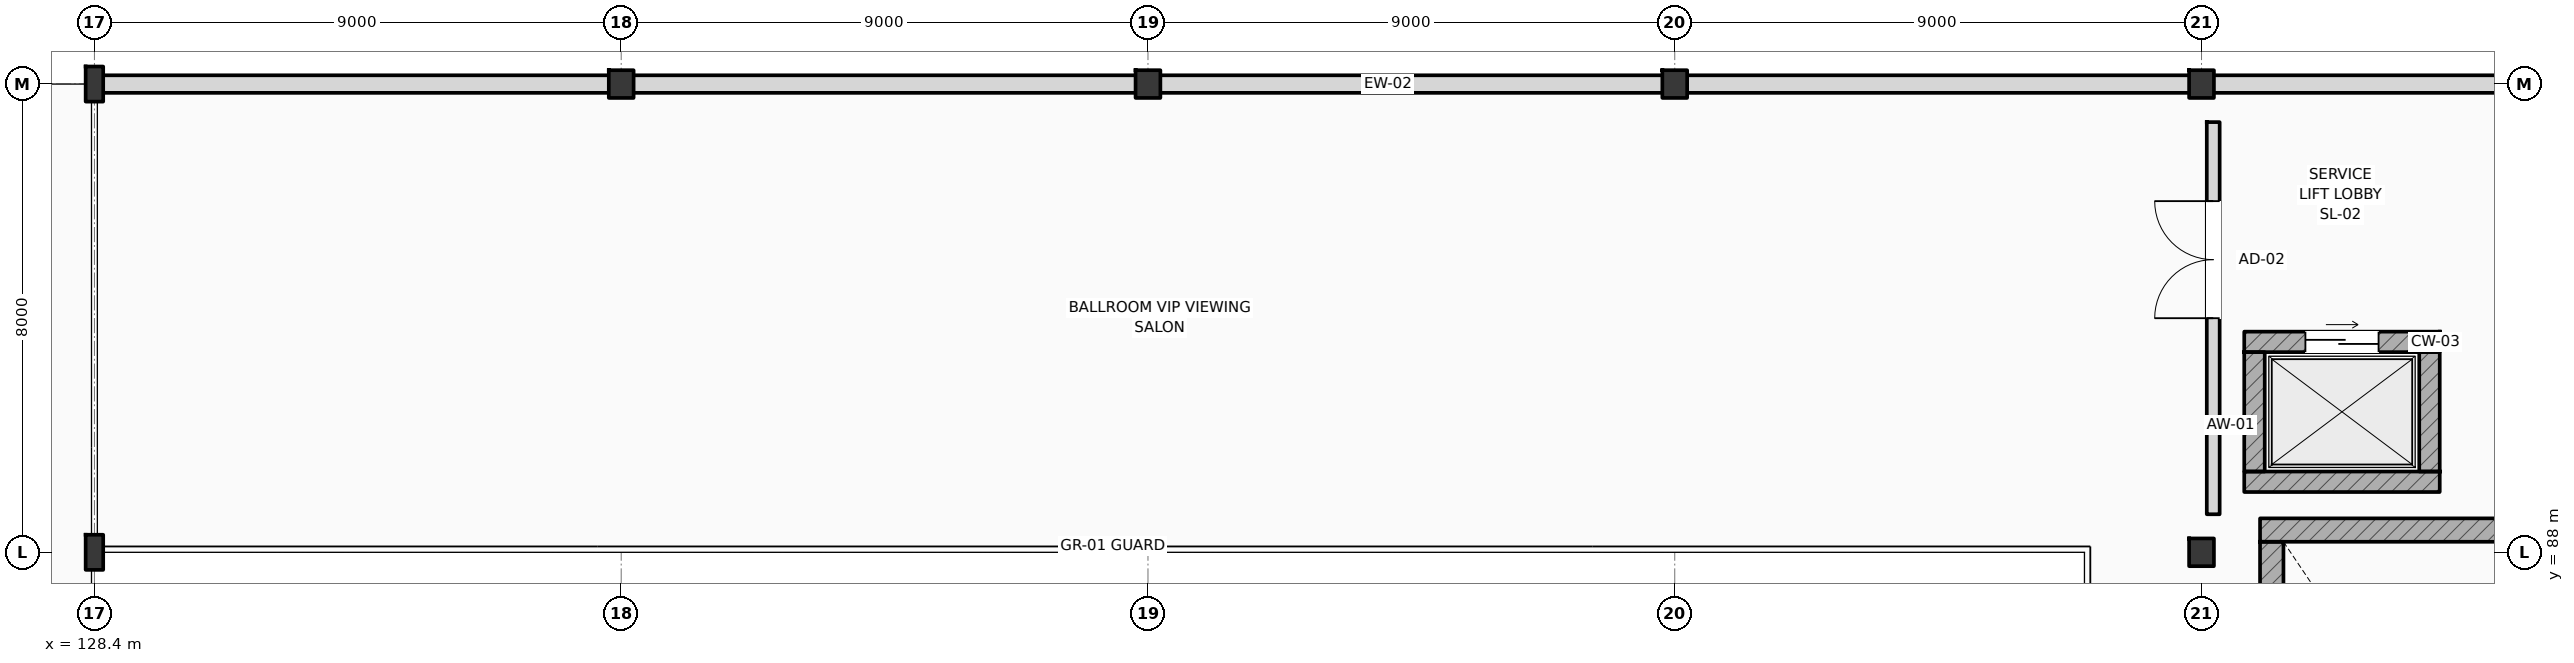
"""IFC4 building model, lengths in metres.
Left out: names, types, materials, properties, quantities, classifications, styles, units other than length and angle.
Written with IfcOpenShell. Run it as: python <this file> out.ifc"""

import sys

from ifc_helpers import new_model, si_unit, direction, frame, frame_2d, origin, origin_2d, place, context, subcontext, project, spatial, rectangle, i_section, extrude, element, fill, save


model = new_model("IFC4")
c1 = context("Model", 3, precision=1e-05, world=origin(), true_north=direction((0.0, 1.0)))
c2 = subcontext(c1, "Body", "Model", "MODEL_VIEW")
j1 = project(units=[si_unit("LENGTHUNIT", "METRE"), si_unit("PLANEANGLEUNIT", "RADIAN")], contexts=[c1])
p1 = place(None, origin())
s1 = spatial("IfcSite", under=j1, at=p1, CompositionType="ELEMENT")
p2 = place(p1, origin())
s2 = spatial("IfcBuilding", under=s1, at=p2, CompositionType="ELEMENT")
p3 = place(p2, frame((0.0, 0.0, 6.0)))
s3 = spatial("IfcBuildingStorey", under=s2, at=p3, CompositionType="ELEMENT", Elevation=6.0)
for number, where, z_axis, x_axis in (
    (1, (128.4, 88.0, 0.0), (0.0, 0.0, 1.0), (1.0, 0.0, 0.0)),
    (2, (128.4, 96.0, 0.0), (0.0, 0.0, 1.0), (1.0, 0.0, 0.0)),
):
    element("IfcColumn", number, at=place(p3, frame(where, z_axis=z_axis, x_axis=x_axis)), inside=s3, PredefinedType="COLUMN", context=c2, shape_type="SweptSolid", body=[
        extrude(i_section(OverallWidth=0.3, OverallDepth=0.6, WebThickness=0.015, FlangeThickness=0.03, FilletRadius=0.027, at=origin_2d()), origin(), (0.0, 0.0, 1.0), 5.4),
    ])
for number, where, z_axis, x_axis in (
    (3, (164.4, 88.0, 0.0), (0.0, 0.0, 1.0), (1.0, 0.0, 0.0)),
    (4, (164.4, 96.0, 0.0), (0.0, 0.0, 1.0), (1.0, 0.0, 0.0)),
    (5, (137.4, 96.0, 0.0), (0.0, 0.0, 1.0), (1.0, 0.0, 0.0)),
    (6, (146.4, 96.0, 0.0), (0.0, 0.0, 1.0), (1.0, 0.0, 0.0)),
    (7, (155.4, 96.0, 0.0), (0.0, 0.0, 1.0), (1.0, 0.0, 0.0)),
):
    element("IfcColumn", number, at=place(p3, frame(where, z_axis=z_axis, x_axis=x_axis)), inside=s3, PredefinedType="COLUMN", context=c2, shape_type="SweptSolid", body=[
        extrude(i_section(OverallWidth=0.424, OverallDepth=0.474, WebThickness=0.045, FlangeThickness=0.055, FilletRadius=0.015, at=origin_2d()), origin(), (0.0, 0.0, 1.0), 5.4),
    ])
p4 = place(p3, frame((165.4, 88.38, 0.0), z_axis=(0.0, 0.0, 1.0), x_axis=(1.0, 0.0, 0.0)))
e8 = element("IfcWall", 8, at=p4, inside=s3, PredefinedType="SHEAR", context=c2, shape_type="SweptSolid", body=[
    extrude(rectangle(XDim=5.1, YDim=0.4, at=frame_2d((2.55, 0.0))), origin(), (0.0, 0.0, 1.0), 5.4),
])
p5 = place(p3, frame((165.6, 79.6, 0.0), z_axis=(0.0, 0.0, 1.0), x_axis=(0.0, 1.0, 0.0)))
e9 = element("IfcWall", 9, at=p5, inside=s3, PredefinedType="SHEAR", context=c2, shape_type="SweptSolid", body=[
    extrude(rectangle(XDim=8.58, YDim=0.4, at=frame_2d((4.29, 0.0))), origin(), (0.0, 0.0, 1.0), 5.4),
])
p6 = place(p5, frame((0.225, 0.0, 0.0)))
e10 = element("IfcOpeningElement", 10, at=p6, cuts=e9, PredefinedType="OPENING", context=c2, shape_type="SweptSolid", body=[
    extrude(rectangle(XDim=1.6, YDim=2.2, at=frame_2d((0.8, 1.1))), frame((0.0, 0.21, 0.0), z_axis=(0.0, -1.0, 0.0), x_axis=(1.0, 0.0, 0.0)), (0.0, 0.0, 1.0), 0.42),
])
for number, where, z_axis, x_axis in (
    (11, (128.4, 96.0, 0.0), (0.0, 0.0, 1.0), (1.0, 0.0, 0.0)),
    (12, (137.4, 96.0, 0.0), (0.0, 0.0, 1.0), (1.0, 0.0, 0.0)),
    (13, (146.4, 96.0, 0.0), (0.0, 0.0, 1.0), (1.0, 0.0, 0.0)),
    (14, (155.4, 96.0, 0.0), (0.0, 0.0, 1.0), (1.0, 0.0, 0.0)),
):
    element("IfcWall", number, at=place(p3, frame(where, z_axis=z_axis, x_axis=x_axis)), inside=s3, PredefinedType="STANDARD", context=c2, shape_type="SweptSolid", body=[
        extrude(rectangle(XDim=9.0, YDim=0.3, at=frame_2d((4.5, 0.0))), origin(), (0.0, 0.0, 1.0), 4.57),
    ])
p7 = place(p3, frame((164.4, 96.0, 0.0), z_axis=(0.0, 0.0, 1.0), x_axis=(1.0, 0.0, 0.0)))
e15 = element("IfcWall", 15, at=p7, inside=s3, PredefinedType="STANDARD", context=c2, shape_type="SweptSolid", body=[
    extrude(rectangle(XDim=7.6, YDim=0.3, at=frame_2d((3.8, 0.0))), origin(), (0.0, 0.0, 1.0), 4.67),
])
p8 = place(p3, frame((165.13, 91.595, 0.0), z_axis=(0.0, 0.0, 1.0), x_axis=(1.0, 0.0, 0.0)))
e16 = element("IfcWall", 16, at=p8, inside=s3, PredefinedType="SHEAR", context=c2, shape_type="SweptSolid", body=[
    extrude(rectangle(XDim=3.34, YDim=0.35, at=frame_2d((1.67, 0.0))), origin(), (0.0, 0.0, 1.0), 5.05),
])
p9 = place(p8, frame((1.045, 0.0, 0.0)))
e17 = element("IfcOpeningElement", 17, at=p9, cuts=e16, PredefinedType="OPENING", context=c2, shape_type="SweptSolid", body=[
    extrude(rectangle(XDim=1.25, YDim=2.25, at=frame_2d((0.625, 1.125))), frame((0.0, 0.185, 0.0), z_axis=(0.0, -1.0, 0.0), x_axis=(1.0, 0.0, 0.0)), (0.0, 0.0, 1.0), 0.37),
])
p10 = place(p3, frame((165.13, 89.205, 0.0), z_axis=(0.0, 0.0, 1.0), x_axis=(1.0, 0.0, 0.0)))
e18 = element("IfcWall", 18, at=p10, inside=s3, PredefinedType="SHEAR", context=c2, shape_type="SweptSolid", body=[
    extrude(rectangle(XDim=3.34, YDim=0.35, at=frame_2d((1.67, 0.0))), origin(), (0.0, 0.0, 1.0), 5.05),
])
for number, where, z_axis, x_axis in (
    (19, (165.305, 89.38, 0.0), (0.0, 0.0, 1.0), (0.0, 1.0, 0.0)),
    (20, (168.295, 89.38, 0.0), (0.0, 0.0, 1.0), (0.0, 1.0, 0.0)),
):
    element("IfcWall", number, at=place(p3, frame(where, z_axis=z_axis, x_axis=x_axis)), inside=s3, PredefinedType="SHEAR", context=c2, shape_type="SweptSolid", body=[
        extrude(rectangle(XDim=2.04, YDim=0.35, at=frame_2d((1.02, 0.0))), origin(), (0.0, 0.0, 1.0), 5.05),
    ])
p11 = place(p3, frame((164.6, 88.65, 0.0), z_axis=(0.0, 0.0, 1.0), x_axis=(0.0, 1.0, 0.0)))
e21 = element("IfcWall", 21, at=p11, inside=s3, PredefinedType="PARTITIONING", context=c2, shape_type="SweptSolid", body=[
    extrude(rectangle(XDim=6.7, YDim=0.22, at=frame_2d((3.35, 0.0))), origin(), (0.0, 0.0, 1.0), 4.72),
])
p12 = place(p11, frame((3.35, 0.0, 0.0)))
e22 = element("IfcOpeningElement", 22, at=p12, cuts=e21, PredefinedType="OPENING", context=c2, shape_type="SweptSolid", body=[
    extrude(rectangle(XDim=2.0, YDim=2.35, at=frame_2d((1.0, 1.175))), frame((0.0, 0.12, 0.0), z_axis=(0.0, -1.0, 0.0), x_axis=(1.0, 0.0, 0.0)), (0.0, 0.0, 1.0), 0.24),
])
p13 = place(p9, origin())
e23 = element("IfcDoor", 23, at=p13, inside=s3, OperationType="SLIDING_TO_LEFT", PredefinedType="DOOR", context=c2, shape_type="SweptSolid", body=[
    extrude(rectangle(XDim=1.25, YDim=2.25, at=frame_2d((0.625, 1.125))), frame((0.0, 0.025, 0.0), z_axis=(0.0, -1.0, 0.0), x_axis=(1.0, 0.0, 0.0)), (0.0, 0.0, 1.0), 0.05),
])
fill(e17, e23)
p14 = place(p12, origin())
e24 = element("IfcDoor", 24, at=p14, inside=s3, OperationType="DOUBLE_SWING_LEFT", PredefinedType="DOOR", context=c2, shape_type="SweptSolid", body=[
    extrude(rectangle(XDim=2.0, YDim=2.35, at=frame_2d((1.0, 1.175))), frame((0.0, 0.025, 0.0), z_axis=(0.0, -1.0, 0.0), x_axis=(1.0, 0.0, 0.0)), (0.0, 0.0, 1.0), 0.05),
])
fill(e22, e24)
save(model, sys.argv[1])
